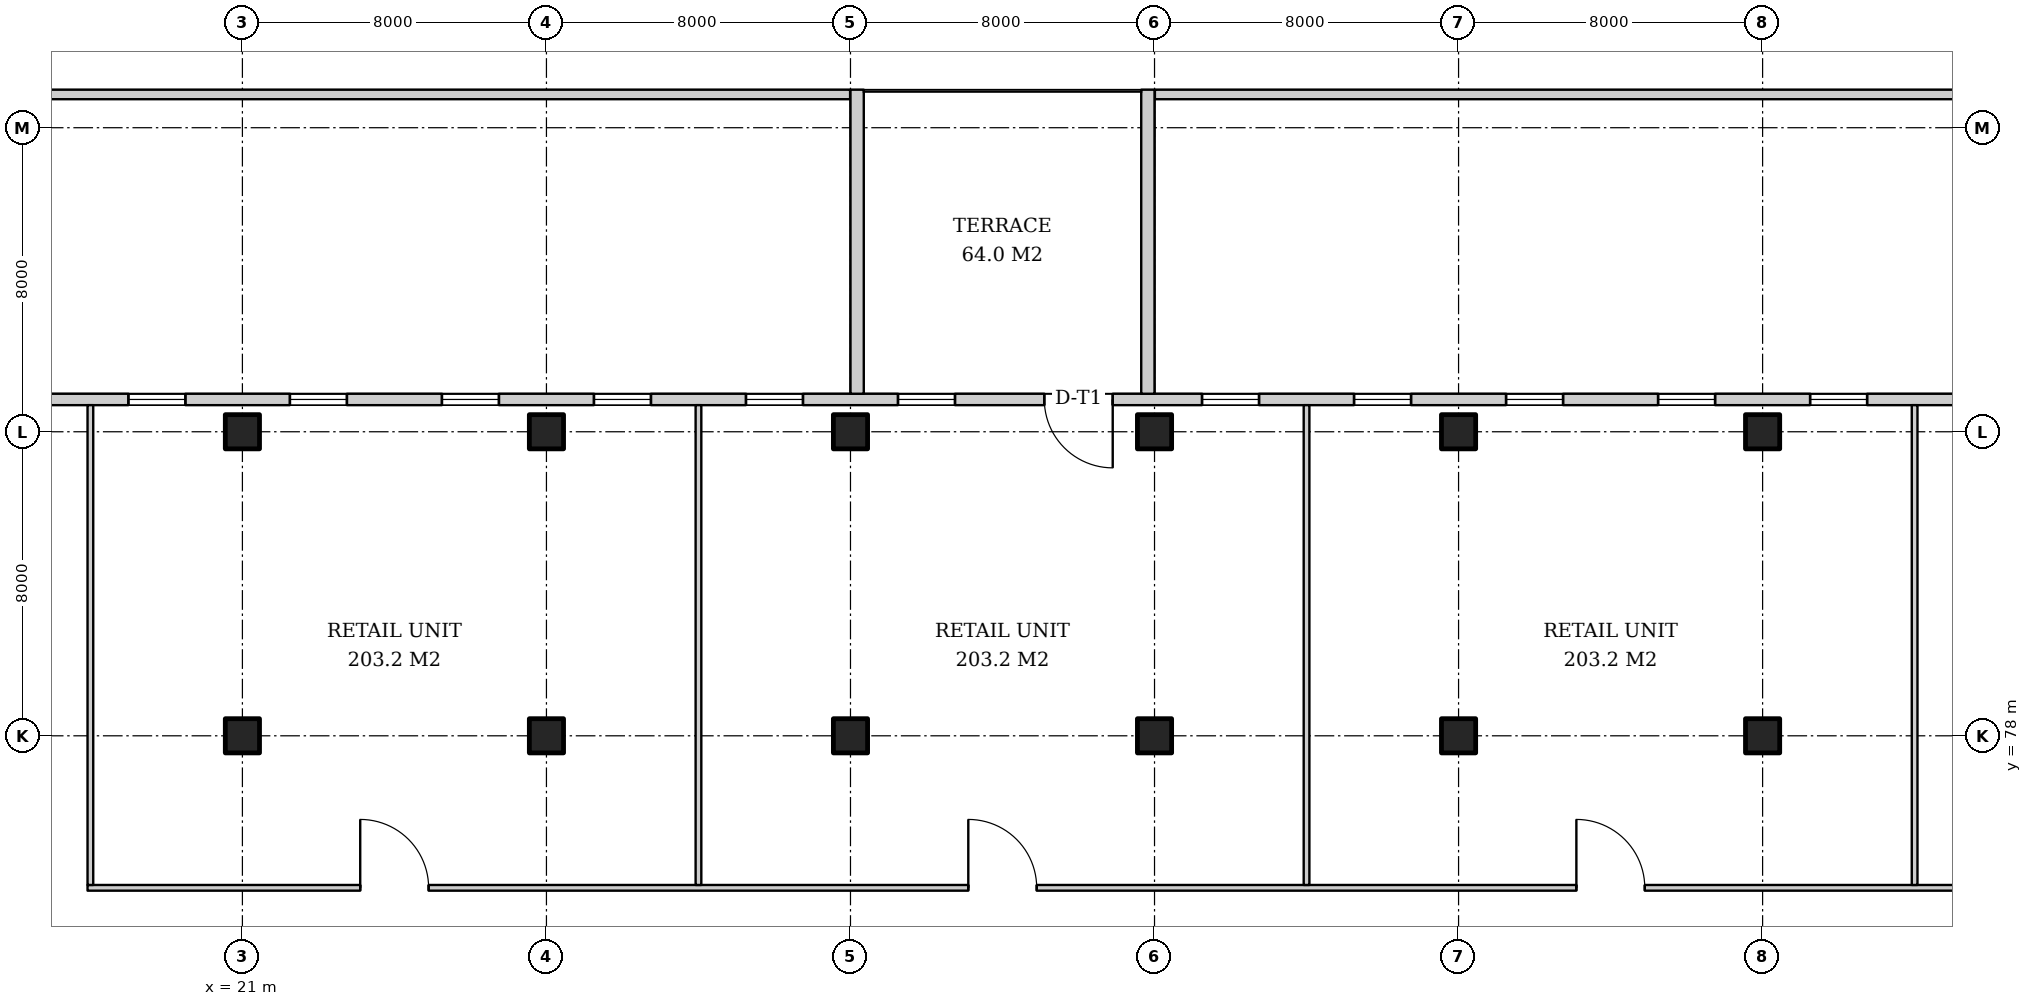
"""IFC4 building model, lengths in metres.
Left out: names, types, materials, properties, quantities, classifications, styles, units other than length and angle.
Written with IfcOpenShell. Run it as: python <this file> out.ifc"""

import sys

from ifc_helpers import new_model, si_unit, direction, frame, frame_2d, origin, origin_2d, place, context, subcontext, project, spatial, rectangle, extrude, element, fill, save


model = new_model("IFC4")
c1 = context("Model", 3, precision=1e-05, world=origin(), true_north=direction((0.0, 1.0)))
c2 = subcontext(c1, "Body", "Model", "MODEL_VIEW")
j1 = project(units=[si_unit("LENGTHUNIT", "METRE"), si_unit("PLANEANGLEUNIT", "RADIAN")], contexts=[c1])
p1 = place(None, origin())
s1 = spatial("IfcSite", under=j1, at=p1, CompositionType="ELEMENT")
p2 = place(p1, origin())
s2 = spatial("IfcBuilding", under=s1, at=p2, CompositionType="ELEMENT")
p3 = place(p2, frame((0.0, 0.0, 6.0)))
s3 = spatial("IfcBuildingStorey", under=s2, at=p3, CompositionType="ELEMENT", Elevation=6.0)
for number, where, z_axis, x_axis in (
    (1, (21.0, 78.0, 0.0), (0.0, 0.0, 1.0), (1.0, 0.0, 0.0)),
    (2, (21.0, 86.0, 0.0), (0.0, 0.0, 1.0), (1.0, 0.0, 0.0)),
    (3, (29.0, 78.0, 0.0), (0.0, 0.0, 1.0), (1.0, 0.0, 0.0)),
    (4, (29.0, 86.0, 0.0), (0.0, 0.0, 1.0), (1.0, 0.0, 0.0)),
    (5, (37.0, 78.0, 0.0), (0.0, 0.0, 1.0), (1.0, 0.0, 0.0)),
    (6, (37.0, 86.0, 0.0), (0.0, 0.0, 1.0), (1.0, 0.0, 0.0)),
    (7, (45.0, 78.0, 0.0), (0.0, 0.0, 1.0), (1.0, 0.0, 0.0)),
    (8, (45.0, 86.0, 0.0), (0.0, 0.0, 1.0), (1.0, 0.0, 0.0)),
    (9, (53.0, 78.0, 0.0), (0.0, 0.0, 1.0), (1.0, 0.0, 0.0)),
    (10, (53.0, 86.0, 0.0), (0.0, 0.0, 1.0), (1.0, 0.0, 0.0)),
    (11, (61.0, 78.0, 0.0), (0.0, 0.0, 1.0), (1.0, 0.0, 0.0)),
    (12, (61.0, 86.0, 0.0), (0.0, 0.0, 1.0), (1.0, 0.0, 0.0)),
):
    element("IfcColumn", number, at=place(p3, frame(where, z_axis=z_axis, x_axis=x_axis)), inside=s3, PredefinedType="COLUMN", context=c2, shape_type="SweptSolid", body=[
        extrude(rectangle(XDim=0.9, YDim=0.9, at=origin_2d()), origin(), (0.0, 0.0, 1.0), 5.0),
    ])
p4 = place(p3, frame((78.0, 86.85, 0.0), z_axis=(0.0, 0.0, 1.0), x_axis=(-1.0, 0.0, 0.0)))
e13 = element("IfcWall", 13, at=p4, inside=s3, PredefinedType="SOLIDWALL", context=c2, shape_type="SweptSolid", body=[
    extrude(rectangle(XDim=66.0, YDim=0.3, at=frame_2d((33.0, 0.0))), origin(), (0.0, 0.0, 1.0), 4.7),
])
p5 = place(p4, frame((1.5, 0.0, 0.9)))
e14 = element("IfcOpeningElement", 14, at=p5, cuts=e13, PredefinedType="OPENING", context=c2, shape_type="SweptSolid", body=[
    extrude(rectangle(XDim=1.5, YDim=3.2, at=frame_2d((0.75, 1.6))), frame((0.0, 0.16, 0.0), z_axis=(0.0, -1.0, 0.0), x_axis=(1.0, 0.0, 0.0)), (0.0, 0.0, 1.0), 0.32),
])
p6 = place(p4, frame((6.0, 0.0, 0.9)))
e15 = element("IfcOpeningElement", 15, at=p6, cuts=e13, PredefinedType="OPENING", context=c2, shape_type="SweptSolid", body=[
    extrude(rectangle(XDim=1.5, YDim=3.2, at=frame_2d((0.75, 1.6))), frame((0.0, 0.16, 0.0), z_axis=(0.0, -1.0, 0.0), x_axis=(1.0, 0.0, 0.0)), (0.0, 0.0, 1.0), 0.32),
])
p7 = place(p4, frame((10.25, 0.0, 0.9)))
e16 = element("IfcOpeningElement", 16, at=p7, cuts=e13, PredefinedType="OPENING", context=c2, shape_type="SweptSolid", body=[
    extrude(rectangle(XDim=1.5, YDim=3.2, at=frame_2d((0.75, 1.6))), frame((0.0, 0.16, 0.0), z_axis=(0.0, -1.0, 0.0), x_axis=(1.0, 0.0, 0.0)), (0.0, 0.0, 1.0), 0.32),
])
p8 = place(p4, frame((14.25, 0.0, 0.9)))
e17 = element("IfcOpeningElement", 17, at=p8, cuts=e13, PredefinedType="OPENING", context=c2, shape_type="SweptSolid", body=[
    extrude(rectangle(XDim=1.5, YDim=3.2, at=frame_2d((0.75, 1.6))), frame((0.0, 0.16, 0.0), z_axis=(0.0, -1.0, 0.0), x_axis=(1.0, 0.0, 0.0)), (0.0, 0.0, 1.0), 0.32),
])
p9 = place(p4, frame((18.25, 0.0, 0.9)))
e18 = element("IfcOpeningElement", 18, at=p9, cuts=e13, PredefinedType="OPENING", context=c2, shape_type="SweptSolid", body=[
    extrude(rectangle(XDim=1.5, YDim=3.2, at=frame_2d((0.75, 1.6))), frame((0.0, 0.16, 0.0), z_axis=(0.0, -1.0, 0.0), x_axis=(1.0, 0.0, 0.0)), (0.0, 0.0, 1.0), 0.32),
])
p10 = place(p4, frame((22.25, 0.0, 0.9)))
e19 = element("IfcOpeningElement", 19, at=p10, cuts=e13, PredefinedType="OPENING", context=c2, shape_type="SweptSolid", body=[
    extrude(rectangle(XDim=1.5, YDim=3.2, at=frame_2d((0.75, 1.6))), frame((0.0, 0.16, 0.0), z_axis=(0.0, -1.0, 0.0), x_axis=(1.0, 0.0, 0.0)), (0.0, 0.0, 1.0), 0.32),
])
p11 = place(p4, frame((26.25, 0.0, 0.9)))
e20 = element("IfcOpeningElement", 20, at=p11, cuts=e13, PredefinedType="OPENING", context=c2, shape_type="SweptSolid", body=[
    extrude(rectangle(XDim=1.5, YDim=3.2, at=frame_2d((0.75, 1.6))), frame((0.0, 0.16, 0.0), z_axis=(0.0, -1.0, 0.0), x_axis=(1.0, 0.0, 0.0)), (0.0, 0.0, 1.0), 0.32),
])
p12 = place(p4, frame((30.25, 0.0, 0.9)))
e21 = element("IfcOpeningElement", 21, at=p12, cuts=e13, PredefinedType="OPENING", context=c2, shape_type="SweptSolid", body=[
    extrude(rectangle(XDim=1.5, YDim=3.2, at=frame_2d((0.75, 1.6))), frame((0.0, 0.16, 0.0), z_axis=(0.0, -1.0, 0.0), x_axis=(1.0, 0.0, 0.0)), (0.0, 0.0, 1.0), 0.32),
])
p13 = place(p4, frame((34.1, 0.0, 0.0)))
e22 = element("IfcOpeningElement", 22, at=p13, cuts=e13, PredefinedType="OPENING", context=c2, shape_type="SweptSolid", body=[
    extrude(rectangle(XDim=1.8, YDim=2.4, at=frame_2d((0.9, 1.2))), frame((0.0, 0.16, 0.0), z_axis=(0.0, -1.0, 0.0), x_axis=(1.0, 0.0, 0.0)), (0.0, 0.0, 1.0), 0.32),
])
p14 = place(p4, frame((38.25, 0.0, 0.9)))
e23 = element("IfcOpeningElement", 23, at=p14, cuts=e13, PredefinedType="OPENING", context=c2, shape_type="SweptSolid", body=[
    extrude(rectangle(XDim=1.5, YDim=3.2, at=frame_2d((0.75, 1.6))), frame((0.0, 0.16, 0.0), z_axis=(0.0, -1.0, 0.0), x_axis=(1.0, 0.0, 0.0)), (0.0, 0.0, 1.0), 0.32),
])
p15 = place(p4, frame((42.25, 0.0, 0.9)))
e24 = element("IfcOpeningElement", 24, at=p15, cuts=e13, PredefinedType="OPENING", context=c2, shape_type="SweptSolid", body=[
    extrude(rectangle(XDim=1.5, YDim=3.2, at=frame_2d((0.75, 1.6))), frame((0.0, 0.16, 0.0), z_axis=(0.0, -1.0, 0.0), x_axis=(1.0, 0.0, 0.0)), (0.0, 0.0, 1.0), 0.32),
])
p16 = place(p4, frame((46.25, 0.0, 0.9)))
e25 = element("IfcOpeningElement", 25, at=p16, cuts=e13, PredefinedType="OPENING", context=c2, shape_type="SweptSolid", body=[
    extrude(rectangle(XDim=1.5, YDim=3.2, at=frame_2d((0.75, 1.6))), frame((0.0, 0.16, 0.0), z_axis=(0.0, -1.0, 0.0), x_axis=(1.0, 0.0, 0.0)), (0.0, 0.0, 1.0), 0.32),
])
p17 = place(p4, frame((50.25, 0.0, 0.9)))
e26 = element("IfcOpeningElement", 26, at=p17, cuts=e13, PredefinedType="OPENING", context=c2, shape_type="SweptSolid", body=[
    extrude(rectangle(XDim=1.5, YDim=3.2, at=frame_2d((0.75, 1.6))), frame((0.0, 0.16, 0.0), z_axis=(0.0, -1.0, 0.0), x_axis=(1.0, 0.0, 0.0)), (0.0, 0.0, 1.0), 0.32),
])
p18 = place(p4, frame((54.25, 0.0, 0.9)))
e27 = element("IfcOpeningElement", 27, at=p18, cuts=e13, PredefinedType="OPENING", context=c2, shape_type="SweptSolid", body=[
    extrude(rectangle(XDim=1.5, YDim=3.2, at=frame_2d((0.75, 1.6))), frame((0.0, 0.16, 0.0), z_axis=(0.0, -1.0, 0.0), x_axis=(1.0, 0.0, 0.0)), (0.0, 0.0, 1.0), 0.32),
])
p19 = place(p4, frame((58.5, 0.0, 0.9)))
e28 = element("IfcOpeningElement", 28, at=p19, cuts=e13, PredefinedType="OPENING", context=c2, shape_type="SweptSolid", body=[
    extrude(rectangle(XDim=1.5, YDim=3.2, at=frame_2d((0.75, 1.6))), frame((0.0, 0.16, 0.0), z_axis=(0.0, -1.0, 0.0), x_axis=(1.0, 0.0, 0.0)), (0.0, 0.0, 1.0), 0.32),
])
p20 = place(p4, frame((63.0, 0.0, 0.9)))
e29 = element("IfcOpeningElement", 29, at=p20, cuts=e13, PredefinedType="OPENING", context=c2, shape_type="SweptSolid", body=[
    extrude(rectangle(XDim=1.5, YDim=3.2, at=frame_2d((0.75, 1.6))), frame((0.0, 0.16, 0.0), z_axis=(0.0, -1.0, 0.0), x_axis=(1.0, 0.0, 0.0)), (0.0, 0.0, 1.0), 0.32),
])
for number, where, z_axis, x_axis in (
    (30, (4.0, 94.875, 0.0), (0.0, 0.0, 1.0), (1.0, 0.0, 0.0)),
    (31, (45.01, 94.875, 0.0), (0.0, 0.0, 1.0), (1.0, 0.0, 0.0)),
):
    element("IfcWall", number, at=place(p3, frame(where, z_axis=z_axis, x_axis=x_axis)), inside=s3, PredefinedType="PARAPET", context=c2, shape_type="SweptSolid", body=[
        extrude(rectangle(XDim=32.99, YDim=0.25, at=frame_2d((16.495, 0.0))), origin(), (0.0, 0.0, 1.0), 1.1),
    ])
for number, where, z_axis, x_axis in (
    (32, (37.175, 87.0, 0.0), (0.0, 0.0, 1.0), (0.0, 1.0, 0.0)),
    (33, (44.825, 87.0, 0.0), (0.0, 0.0, 1.0), (0.0, 1.0, 0.0)),
):
    element("IfcWall", number, at=place(p3, frame(where, z_axis=z_axis, x_axis=x_axis)), inside=s3, PredefinedType="PARAPET", context=c2, shape_type="SweptSolid", body=[
        extrude(rectangle(XDim=8.0, YDim=0.35, at=frame_2d((4.0, 0.0))), origin(), (0.0, 0.0, 1.0), 1.1),
    ])
p21 = place(p3, frame((16.925, 74.0, 0.0), z_axis=(0.0, 0.0, 1.0), x_axis=(1.0, 0.0, 0.0)))
e34 = element("IfcWall", 34, at=p21, inside=s3, PredefinedType="PARTITIONING", context=c2, shape_type="SweptSolid", body=[
    extrude(rectangle(XDim=60.775, YDim=0.15, at=frame_2d((30.387, 0.0))), origin(), (0.0, 0.0, 1.0), 4.7),
])
p22 = place(p21, frame((7.175, 0.0, 0.0)))
e35 = element("IfcOpeningElement", 35, at=p22, cuts=e34, PredefinedType="OPENING", context=c2, shape_type="SweptSolid", body=[
    extrude(rectangle(XDim=1.8, YDim=2.4, at=frame_2d((0.9, 1.2))), frame((0.0, 0.085, 0.0), z_axis=(0.0, -1.0, 0.0), x_axis=(1.0, 0.0, 0.0)), (0.0, 0.0, 1.0), 0.17),
])
p23 = place(p21, frame((23.175, 0.0, 0.0)))
e36 = element("IfcOpeningElement", 36, at=p23, cuts=e34, PredefinedType="OPENING", context=c2, shape_type="SweptSolid", body=[
    extrude(rectangle(XDim=1.8, YDim=2.4, at=frame_2d((0.9, 1.2))), frame((0.0, 0.085, 0.0), z_axis=(0.0, -1.0, 0.0), x_axis=(1.0, 0.0, 0.0)), (0.0, 0.0, 1.0), 0.17),
])
p24 = place(p21, frame((39.175, 0.0, 0.0)))
e37 = element("IfcOpeningElement", 37, at=p24, cuts=e34, PredefinedType="OPENING", context=c2, shape_type="SweptSolid", body=[
    extrude(rectangle(XDim=1.8, YDim=2.4, at=frame_2d((0.9, 1.2))), frame((0.0, 0.085, 0.0), z_axis=(0.0, -1.0, 0.0), x_axis=(1.0, 0.0, 0.0)), (0.0, 0.0, 1.0), 0.17),
])
p25 = place(p21, frame((53.525, 0.0, 0.0)))
e38 = element("IfcOpeningElement", 38, at=p25, cuts=e34, PredefinedType="OPENING", context=c2, shape_type="SweptSolid", body=[
    extrude(rectangle(XDim=1.8, YDim=2.4, at=frame_2d((0.9, 1.2))), frame((0.0, 0.085, 0.0), z_axis=(0.0, -1.0, 0.0), x_axis=(1.0, 0.0, 0.0)), (0.0, 0.0, 1.0), 0.17),
])
for number, where, z_axis, x_axis in (
    (39, (17.0, 74.075, 0.0), (0.0, 0.0, 1.0), (0.0, 1.0, 0.0)),
    (40, (33.0, 74.075, 0.0), (0.0, 0.0, 1.0), (0.0, 1.0, 0.0)),
    (41, (49.0, 74.075, 0.0), (0.0, 0.0, 1.0), (0.0, 1.0, 0.0)),
    (42, (65.0, 74.075, 0.0), (0.0, 0.0, 1.0), (0.0, 1.0, 0.0)),
):
    element("IfcWall", number, at=place(p3, frame(where, z_axis=z_axis, x_axis=x_axis)), inside=s3, PredefinedType="PARTITIONING", context=c2, shape_type="SweptSolid", body=[
        extrude(rectangle(XDim=12.625, YDim=0.15, at=frame_2d((6.312, 0.0))), origin(), (0.0, 0.0, 1.0), 3.2),
    ])
p26 = place(p8, origin())
e43 = element("IfcWindow", 43, at=p26, inside=s3, PartitioningType="SINGLE_PANEL", PredefinedType="WINDOW", context=c2, shape_type="SweptSolid", body=[
    extrude(rectangle(XDim=1.5, YDim=3.2, at=frame_2d((0.75, 1.6))), frame((0.0, 0.03, 0.0), z_axis=(0.0, -1.0, 0.0), x_axis=(1.0, 0.0, 0.0)), (0.0, 0.0, 1.0), 0.06),
])
fill(e17, e43)
p27 = place(p9, origin())
e44 = element("IfcWindow", 44, at=p27, inside=s3, PartitioningType="SINGLE_PANEL", PredefinedType="WINDOW", context=c2, shape_type="SweptSolid", body=[
    extrude(rectangle(XDim=1.5, YDim=3.2, at=frame_2d((0.75, 1.6))), frame((0.0, 0.03, 0.0), z_axis=(0.0, -1.0, 0.0), x_axis=(1.0, 0.0, 0.0)), (0.0, 0.0, 1.0), 0.06),
])
fill(e18, e44)
p28 = place(p10, origin())
e45 = element("IfcWindow", 45, at=p28, inside=s3, PartitioningType="SINGLE_PANEL", PredefinedType="WINDOW", context=c2, shape_type="SweptSolid", body=[
    extrude(rectangle(XDim=1.5, YDim=3.2, at=frame_2d((0.75, 1.6))), frame((0.0, 0.03, 0.0), z_axis=(0.0, -1.0, 0.0), x_axis=(1.0, 0.0, 0.0)), (0.0, 0.0, 1.0), 0.06),
])
fill(e19, e45)
p29 = place(p11, origin())
e46 = element("IfcWindow", 46, at=p29, inside=s3, PartitioningType="SINGLE_PANEL", PredefinedType="WINDOW", context=c2, shape_type="SweptSolid", body=[
    extrude(rectangle(XDim=1.5, YDim=3.2, at=frame_2d((0.75, 1.6))), frame((0.0, 0.03, 0.0), z_axis=(0.0, -1.0, 0.0), x_axis=(1.0, 0.0, 0.0)), (0.0, 0.0, 1.0), 0.06),
])
fill(e20, e46)
p30 = place(p12, origin())
e47 = element("IfcWindow", 47, at=p30, inside=s3, PartitioningType="SINGLE_PANEL", PredefinedType="WINDOW", context=c2, shape_type="SweptSolid", body=[
    extrude(rectangle(XDim=1.5, YDim=3.2, at=frame_2d((0.75, 1.6))), frame((0.0, 0.03, 0.0), z_axis=(0.0, -1.0, 0.0), x_axis=(1.0, 0.0, 0.0)), (0.0, 0.0, 1.0), 0.06),
])
fill(e21, e47)
p31 = place(p13, origin())
e48 = element("IfcDoor", 48, at=p31, inside=s3, OperationType="DOUBLE_DOOR_SINGLE_SWING", PredefinedType="DOOR", context=c2, shape_type="SweptSolid", body=[
    extrude(rectangle(XDim=1.8, YDim=2.4, at=frame_2d((0.9, 1.2))), frame((0.0, 0.025, 0.0), z_axis=(0.0, -1.0, 0.0), x_axis=(1.0, 0.0, 0.0)), (0.0, 0.0, 1.0), 0.05),
])
fill(e22, e48)
p32 = place(p14, origin())
e49 = element("IfcWindow", 49, at=p32, inside=s3, PartitioningType="SINGLE_PANEL", PredefinedType="WINDOW", context=c2, shape_type="SweptSolid", body=[
    extrude(rectangle(XDim=1.5, YDim=3.2, at=frame_2d((0.75, 1.6))), frame((0.0, 0.03, 0.0), z_axis=(0.0, -1.0, 0.0), x_axis=(1.0, 0.0, 0.0)), (0.0, 0.0, 1.0), 0.06),
])
fill(e23, e49)
p33 = place(p15, origin())
e50 = element("IfcWindow", 50, at=p33, inside=s3, PartitioningType="SINGLE_PANEL", PredefinedType="WINDOW", context=c2, shape_type="SweptSolid", body=[
    extrude(rectangle(XDim=1.5, YDim=3.2, at=frame_2d((0.75, 1.6))), frame((0.0, 0.03, 0.0), z_axis=(0.0, -1.0, 0.0), x_axis=(1.0, 0.0, 0.0)), (0.0, 0.0, 1.0), 0.06),
])
fill(e24, e50)
p34 = place(p16, origin())
e51 = element("IfcWindow", 51, at=p34, inside=s3, PartitioningType="SINGLE_PANEL", PredefinedType="WINDOW", context=c2, shape_type="SweptSolid", body=[
    extrude(rectangle(XDim=1.5, YDim=3.2, at=frame_2d((0.75, 1.6))), frame((0.0, 0.03, 0.0), z_axis=(0.0, -1.0, 0.0), x_axis=(1.0, 0.0, 0.0)), (0.0, 0.0, 1.0), 0.06),
])
fill(e25, e51)
p35 = place(p17, origin())
e52 = element("IfcWindow", 52, at=p35, inside=s3, PartitioningType="SINGLE_PANEL", PredefinedType="WINDOW", context=c2, shape_type="SweptSolid", body=[
    extrude(rectangle(XDim=1.5, YDim=3.2, at=frame_2d((0.75, 1.6))), frame((0.0, 0.03, 0.0), z_axis=(0.0, -1.0, 0.0), x_axis=(1.0, 0.0, 0.0)), (0.0, 0.0, 1.0), 0.06),
])
fill(e26, e52)
p36 = place(p18, origin())
e53 = element("IfcWindow", 53, at=p36, inside=s3, PartitioningType="SINGLE_PANEL", PredefinedType="WINDOW", context=c2, shape_type="SweptSolid", body=[
    extrude(rectangle(XDim=1.5, YDim=3.2, at=frame_2d((0.75, 1.6))), frame((0.0, 0.03, 0.0), z_axis=(0.0, -1.0, 0.0), x_axis=(1.0, 0.0, 0.0)), (0.0, 0.0, 1.0), 0.06),
])
fill(e27, e53)
p37 = place(p19, origin())
e54 = element("IfcWindow", 54, at=p37, inside=s3, PartitioningType="SINGLE_PANEL", PredefinedType="WINDOW", context=c2, shape_type="SweptSolid", body=[
    extrude(rectangle(XDim=1.5, YDim=3.2, at=frame_2d((0.75, 1.6))), frame((0.0, 0.03, 0.0), z_axis=(0.0, -1.0, 0.0), x_axis=(1.0, 0.0, 0.0)), (0.0, 0.0, 1.0), 0.06),
])
fill(e28, e54)
p38 = place(p22, origin())
e55 = element("IfcDoor", 55, at=p38, inside=s3, OperationType="DOUBLE_DOOR_SINGLE_SWING", PredefinedType="DOOR", context=c2, shape_type="SweptSolid", body=[
    extrude(rectangle(XDim=1.8, YDim=2.4, at=frame_2d((0.9, 1.2))), frame((0.0, 0.025, 0.0), z_axis=(0.0, -1.0, 0.0), x_axis=(1.0, 0.0, 0.0)), (0.0, 0.0, 1.0), 0.05),
])
fill(e35, e55)
p39 = place(p23, origin())
e56 = element("IfcDoor", 56, at=p39, inside=s3, OperationType="DOUBLE_DOOR_SINGLE_SWING", PredefinedType="DOOR", context=c2, shape_type="SweptSolid", body=[
    extrude(rectangle(XDim=1.8, YDim=2.4, at=frame_2d((0.9, 1.2))), frame((0.0, 0.025, 0.0), z_axis=(0.0, -1.0, 0.0), x_axis=(1.0, 0.0, 0.0)), (0.0, 0.0, 1.0), 0.05),
])
fill(e36, e56)
p40 = place(p24, origin())
e57 = element("IfcDoor", 57, at=p40, inside=s3, OperationType="DOUBLE_DOOR_SINGLE_SWING", PredefinedType="DOOR", context=c2, shape_type="SweptSolid", body=[
    extrude(rectangle(XDim=1.8, YDim=2.4, at=frame_2d((0.9, 1.2))), frame((0.0, 0.025, 0.0), z_axis=(0.0, -1.0, 0.0), x_axis=(1.0, 0.0, 0.0)), (0.0, 0.0, 1.0), 0.05),
])
fill(e37, e57)
save(model, sys.argv[1])
